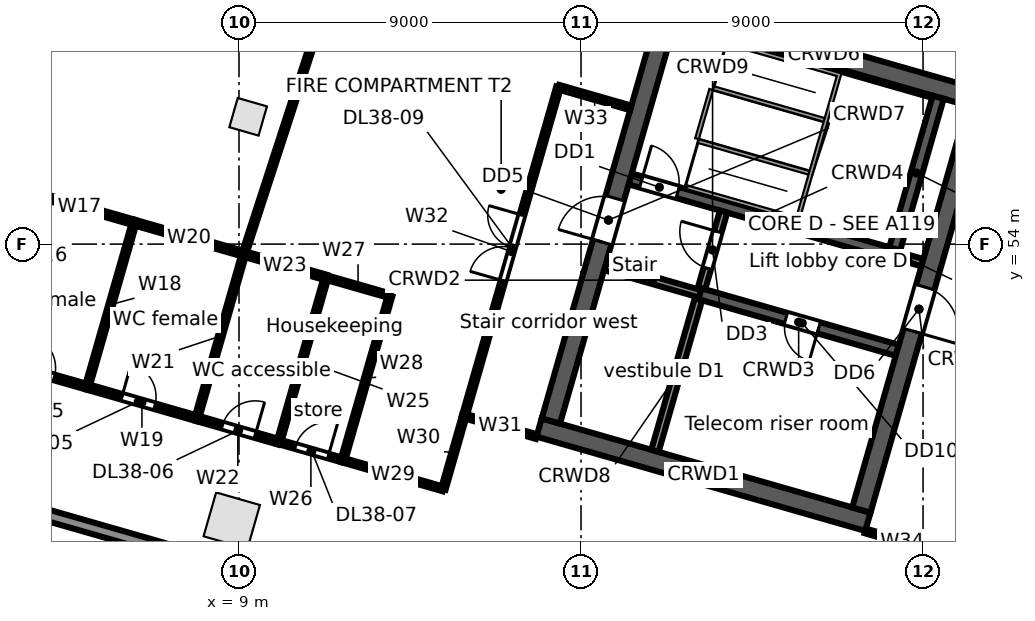
"""IFC4 building model, lengths in metres.
Left out: names, types, materials, properties, quantities, classifications, styles, units other than length and angle.
Written with IfcOpenShell. Run it as: python <this file> out.ifc"""

import sys

from ifc_helpers import new_model, si_unit, direction, frame, frame_2d, origin, origin_2d, place, context, subcontext, project, spatial, rectangle, extrude, element, fill, save


model = new_model("IFC4")
c1 = context("Model", 3, precision=1e-05, world=origin(), true_north=direction((0.0, 1.0)))
c2 = subcontext(c1, "Body", "Model", "MODEL_VIEW")
j1 = project(units=[si_unit("LENGTHUNIT", "METRE"), si_unit("PLANEANGLEUNIT", "RADIAN")], contexts=[c1])
p1 = place(None, origin())
s1 = spatial("IfcSite", under=j1, at=p1, CompositionType="ELEMENT")
p2 = place(p1, origin())
s2 = spatial("IfcBuilding", under=s1, at=p2, CompositionType="ELEMENT")
p3 = place(p2, frame((0.0, 0.0, 186.9)))
s3 = spatial("IfcBuildingStorey", under=s2, at=p3, CompositionType="ELEMENT", Elevation=186.9)
p4 = place(p3, frame((8.81, 46.722, 0.0), z_axis=(0.0, 0.0, 1.0), x_axis=(0.961261695938, -0.275637355817, 0.0)))
e1 = element("IfcColumn", 1, at=p4, inside=s3, PredefinedType="COLUMN", context=c2, shape_type="SweptSolid", body=[
    extrude(rectangle(XDim=1.2, YDim=1.2, at=origin_2d()), origin(), (0.0, 0.0, 1.0), 4.0),
])
p5 = place(p3, frame((9.241, 57.35, 0.0), z_axis=(0.0, 0.0, 1.0), x_axis=(0.961261695938, -0.275637355817, 0.0)))
e2 = element("IfcColumn", 2, at=p5, inside=s3, PredefinedType="COLUMN", context=c2, shape_type="SweptSolid", body=[
    extrude(rectangle(XDim=0.8, YDim=0.8, at=origin_2d()), origin(), (0.0, 0.0, 1.0), 4.0),
])
p6 = place(p3, frame((24.042, 41.106, 0.0), z_axis=(0.0, 0.0, 1.0), x_axis=(-0.961261693976, 0.275637362661, 0.0)))
e3 = element("IfcWall", 3, at=p6, inside=s3, PredefinedType="STANDARD", context=c2, shape_type="SweptSolid", body=[
    extrude(rectangle(XDim=24.948, YDim=0.3, at=frame_2d((12.474, 0.0))), origin(), (0.0, 0.0, 1.0), 3.68),
])
p7 = place(p6, frame((21.441, 0.0, 0.6)))
e4 = element("IfcOpeningElement", 4, at=p7, cuts=e3, PredefinedType="OPENING", context=c2, shape_type="SweptSolid", body=[
    extrude(rectangle(XDim=0.9, YDim=2.4, at=frame_2d((0.45, 1.2))), frame((0.0, 0.16, 0.0), z_axis=(0.0, -1.0, 0.0), x_axis=(1.0, 0.0, 0.0)), (0.0, 0.0, 1.0), 0.32),
])
p8 = place(p6, frame((13.121, 0.0, 0.6)))
e5 = element("IfcOpeningElement", 5, at=p8, cuts=e3, PredefinedType="OPENING", context=c2, shape_type="SweptSolid", body=[
    extrude(rectangle(XDim=0.9, YDim=2.4, at=frame_2d((0.45, 1.2))), frame((0.0, 0.16, 0.0), z_axis=(0.0, -1.0, 0.0), x_axis=(1.0, 0.0, 0.0)), (0.0, 0.0, 1.0), 0.32),
])
p9 = place(p6, frame((10.591, 0.0, 0.0)))
e6 = element("IfcOpeningElement", 6, at=p9, cuts=e3, PredefinedType="OPENING", context=c2, shape_type="SweptSolid", body=[
    extrude(rectangle(XDim=1.8, YDim=2.4, at=frame_2d((0.9, 1.2))), frame((0.0, 0.16, 0.0), z_axis=(0.0, -1.0, 0.0), x_axis=(1.0, 0.0, 0.0)), (0.0, 0.0, 1.0), 0.32),
])
p10 = place(p6, frame((4.8, 0.0, 0.6)))
e7 = element("IfcOpeningElement", 7, at=p10, cuts=e3, PredefinedType="OPENING", context=c2, shape_type="SweptSolid", body=[
    extrude(rectangle(XDim=0.9, YDim=2.4, at=frame_2d((0.45, 1.2))), frame((0.0, 0.16, 0.0), z_axis=(0.0, -1.0, 0.0), x_axis=(1.0, 0.0, 0.0)), (0.0, 0.0, 1.0), 0.32),
])
p11 = place(p6, frame((2.27, 0.0, 0.0)))
e8 = element("IfcOpeningElement", 8, at=p11, cuts=e3, PredefinedType="OPENING", context=c2, shape_type="SweptSolid", body=[
    extrude(rectangle(XDim=1.8, YDim=2.4, at=frame_2d((0.9, 1.2))), frame((0.0, 0.16, 0.0), z_axis=(0.0, -1.0, 0.0), x_axis=(1.0, 0.0, 0.0)), (0.0, 0.0, 1.0), 0.32),
])
p12 = place(p3, frame((37.399, 59.851, 0.0), z_axis=(0.0, 0.0, 1.0), x_axis=(-0.529919986982, -0.848047644532, 0.0)))
e9 = element("IfcWall", 9, at=p12, inside=s3, PredefinedType="STANDARD", context=c2, shape_type="SweptSolid", body=[
    extrude(rectangle(XDim=21.125, YDim=0.3, at=frame_2d((10.562, 0.0))), origin(), (0.0, 0.0, 1.0), 3.68),
])
p13 = place(p12, frame((16.687, 0.0, 0.6)))
e10 = element("IfcOpeningElement", 10, at=p13, cuts=e9, PredefinedType="OPENING", context=c2, shape_type="SweptSolid", body=[
    extrude(rectangle(XDim=0.9, YDim=2.4, at=frame_2d((0.45, 1.2))), frame((0.0, 0.16, 0.0), z_axis=(0.0, -1.0, 0.0), x_axis=(1.0, 0.0, 0.0)), (0.0, 0.0, 1.0), 0.32),
])
p14 = place(p12, frame((6.187, 0.0, 0.6)))
e11 = element("IfcOpeningElement", 11, at=p14, cuts=e9, PredefinedType="OPENING", context=c2, shape_type="SweptSolid", body=[
    extrude(rectangle(XDim=0.9, YDim=2.4, at=frame_2d((0.45, 1.2))), frame((0.0, 0.16, 0.0), z_axis=(0.0, -1.0, 0.0), x_axis=(1.0, 0.0, 0.0)), (0.0, 0.0, 1.0), 0.32),
])
p15 = place(p3, frame((16.897, 49.173, 0.0), z_axis=(0.0, 0.0, 1.0), x_axis=(0.96126248289, -0.275634611374, 0.0)))
e12 = element("IfcWall", 12, at=p15, inside=s3, PredefinedType="SOLIDWALL", context=c2, shape_type="SweptSolid", body=[
    extrude(rectangle(XDim=9.0, YDim=0.5, at=frame_2d((4.5, 0.0))), origin(), (0.0, 0.0, 1.0), 3.68),
])
p16 = place(p3, frame((18.632, 53.409, 0.0), z_axis=(0.0, 0.0, 1.0), x_axis=(0.961247078216, -0.275688328772, 0.0)))
e13 = element("IfcWall", 13, at=p16, inside=s3, PredefinedType="SOLIDWALL", context=c2, shape_type="SweptSolid", body=[
    extrude(rectangle(XDim=2.6, YDim=0.2, at=frame_2d((1.3, 0.0))), origin(), (0.0, 0.0, 1.0), 3.68),
])
p17 = place(p3, frame((21.131, 52.692, 0.0), z_axis=(0.0, 0.0, 1.0), x_axis=(0.961271043721, -0.27560475414, 0.0)))
e14 = element("IfcWall", 14, at=p17, inside=s3, PredefinedType="SOLIDWALL", context=c2, shape_type="SweptSolid", body=[
    extrude(rectangle(XDim=5.4, YDim=0.3, at=frame_2d((2.7, 0.0))), origin(), (0.0, 0.0, 1.0), 3.68),
])
p18 = place(p17, frame((2.35, 0.0, 0.0)))
e15 = element("IfcOpeningElement", 15, at=p18, cuts=e14, PredefinedType="OPENING", context=c2, shape_type="SweptSolid", body=[
    extrude(rectangle(XDim=0.9, YDim=2.1, at=frame_2d((0.45, 1.05))), frame((0.0, 0.16, 0.0), z_axis=(0.0, -1.0, 0.0), x_axis=(1.0, 0.0, 0.0)), (0.0, 0.0, 1.0), 0.32),
])
p19 = place(p3, frame((19.293, 55.716, 0.0), z_axis=(0.0, 0.0, 1.0), x_axis=(0.96125862491, -0.275648065539, 0.0)))
e16 = element("IfcWall", 16, at=p19, inside=s3, PredefinedType="SOLIDWALL", context=c2, shape_type="SweptSolid", body=[
    extrude(rectangle(XDim=7.2, YDim=0.3, at=frame_2d((3.6, 0.0))), origin(), (0.0, 0.0, 1.0), 3.68),
])
p20 = place(p19, frame((0.3, 0.0, 0.0)))
e17 = element("IfcOpeningElement", 17, at=p20, cuts=e16, PredefinedType="OPENING", context=c2, shape_type="SweptSolid", body=[
    extrude(rectangle(XDim=1.0, YDim=2.1, at=frame_2d((0.5, 1.05))), frame((0.0, 0.16, 0.0), z_axis=(0.0, -1.0, 0.0), x_axis=(1.0, 0.0, 0.0)), (0.0, 0.0, 1.0), 0.32),
])
p21 = place(p3, frame((26.214, 53.732, 0.0), z_axis=(0.0, 0.0, 1.0), x_axis=(0.961200870072, -0.275849392554, 0.0)))
e18 = element("IfcWall", 18, at=p21, inside=s3, PredefinedType="SOLIDWALL", context=c2, shape_type="SweptSolid", body=[
    extrude(rectangle(XDim=0.8, YDim=0.2, at=frame_2d((0.4, 0.0))), origin(), (0.0, 0.0, 1.0), 3.68),
])
p22 = place(p3, frame((20.067, 60.228, 0.0), z_axis=(0.0, 0.0, 1.0), x_axis=(0.96126248289, -0.275634611374, 0.0)))
e19 = element("IfcWall", 19, at=p22, inside=s3, PredefinedType="SOLIDWALL", context=c2, shape_type="SweptSolid", body=[
    extrude(rectangle(XDim=9.0, YDim=0.5, at=frame_2d((4.5, 0.0))), origin(), (0.0, 0.0, 1.0), 3.68),
])
p23 = place(p3, frame((17.206, 49.344, 0.0), z_axis=(0.0, 0.0, 1.0), x_axis=(0.275632651182, 0.961263044958, 0.0)))
e20 = element("IfcWall", 20, at=p23, inside=s3, PredefinedType="SOLIDWALL", context=c2, shape_type="SweptSolid", body=[
    extrude(rectangle(XDim=11.0, YDim=0.5, at=frame_2d((5.5, 0.0))), origin(), (0.0, 0.0, 1.0), 3.68),
])
p24 = place(p23, frame((4.9, 0.0, 0.0)))
e21 = element("IfcOpeningElement", 21, at=p24, cuts=e20, PredefinedType="OPENING", context=c2, shape_type="SweptSolid", body=[
    extrude(rectangle(XDim=1.2, YDim=2.1, at=frame_2d((0.6, 1.05))), frame((0.0, 0.26, 0.0), z_axis=(0.0, -1.0, 0.0), x_axis=(1.0, 0.0, 0.0)), (0.0, 0.0, 1.0), 0.52),
])
p25 = place(p3, frame((19.946, 48.559, 0.0), z_axis=(0.0, 0.0, 1.0), x_axis=(0.275668905258, 0.961252648721, 0.0)))
e22 = element("IfcWall", 22, at=p25, inside=s3, PredefinedType="SOLIDWALL", context=c2, shape_type="SweptSolid", body=[
    extrude(rectangle(XDim=4.15, YDim=0.2, at=frame_2d((2.075, 0.0))), origin(), (0.0, 0.0, 1.0), 3.68),
])
p26 = place(p3, frame((21.172, 52.837, 0.0), z_axis=(0.0, 0.0, 1.0), x_axis=(0.275657676022, 0.961255868981, 0.0)))
e23 = element("IfcWall", 23, at=p26, inside=s3, PredefinedType="PARTITIONING", context=c2, shape_type="SweptSolid", body=[
    extrude(rectangle(XDim=2.1, YDim=0.2, at=frame_2d((1.05, 0.0))), origin(), (0.0, 0.0, 1.0), 3.68),
])
p27 = place(p26, frame((0.55, 0.0, 0.0)))
e24 = element("IfcOpeningElement", 24, at=p27, cuts=e23, PredefinedType="OPENING", context=c2, shape_type="SweptSolid", body=[
    extrude(rectangle(XDim=1.0, YDim=2.1, at=frame_2d((0.5, 1.05))), frame((0.0, 0.11, 0.0), z_axis=(0.0, -1.0, 0.0), x_axis=(1.0, 0.0, 0.0)), (0.0, 0.0, 1.0), 0.22),
])
p28 = place(p3, frame((26.256, 53.876, 0.0), z_axis=(0.0, 0.0, 1.0), x_axis=(0.275614546295, 0.961268236171, 0.0)))
e25 = element("IfcWall", 25, at=p28, inside=s3, PredefinedType="SOLIDWALL", context=c2, shape_type="SweptSolid", body=[
    extrude(rectangle(XDim=4.15, YDim=0.3, at=frame_2d((2.075, 0.0))), origin(), (0.0, 0.0, 1.0), 3.68),
])
p29 = place(p3, frame((25.377, 47.002, 0.0), z_axis=(0.0, 0.0, 1.0), x_axis=(0.275632651182, 0.961263044958, 0.0)))
e26 = element("IfcWall", 26, at=p29, inside=s3, PredefinedType="SOLIDWALL", context=c2, shape_type="SweptSolid", body=[
    extrude(rectangle(XDim=11.0, YDim=0.5, at=frame_2d((5.5, 0.0))), origin(), (0.0, 0.0, 1.0), 3.68),
])
p30 = place(p29, frame((4.9, 0.0, 0.0)))
e27 = element("IfcOpeningElement", 27, at=p30, cuts=e26, PredefinedType="OPENING", context=c2, shape_type="SweptSolid", body=[
    extrude(rectangle(XDim=1.2, YDim=2.1, at=frame_2d((0.6, 1.05))), frame((0.0, 0.26, 0.0), z_axis=(0.0, -1.0, 0.0), x_axis=(1.0, 0.0, 0.0)), (0.0, 0.0, 1.0), 0.52),
])
p31 = place(p3, frame((2.601, 50.932, 0.0), z_axis=(0.0, 0.0, 1.0), x_axis=(0.961265528111, -0.275623991092, 0.0)))
e28 = element("IfcWall", 28, at=p31, inside=s3, PredefinedType="PARTITIONING", context=c2, shape_type="SweptSolid", body=[
    extrude(rectangle(XDim=2.5, YDim=0.15, at=frame_2d((1.25, 0.0))), origin(), (0.0, 0.0, 1.0), 3.68),
])
p32 = place(p31, frame((0.7, 0.0, 0.0)))
e29 = element("IfcOpeningElement", 29, at=p32, cuts=e28, PredefinedType="OPENING", context=c2, shape_type="SweptSolid", body=[
    extrude(rectangle(XDim=0.9, YDim=2.1, at=frame_2d((0.45, 1.05))), frame((0.0, 0.085, 0.0), z_axis=(0.0, -1.0, 0.0), x_axis=(1.0, 0.0, 0.0)), (0.0, 0.0, 1.0), 0.17),
])
p33 = place(p3, frame((3.361, 55.395, 0.0), z_axis=(0.0, 0.0, 1.0), x_axis=(0.961268664977, -0.27561305073, 0.0)))
e30 = element("IfcWall", 30, at=p33, inside=s3, PredefinedType="PARTITIONING", context=c2, shape_type="SweptSolid", body=[
    extrude(rectangle(XDim=3.0, YDim=0.15, at=frame_2d((1.5, 0.0))), origin(), (0.0, 0.0, 1.0), 3.68),
])
p34 = place(p3, frame((5.004, 50.243, 0.0), z_axis=(0.0, 0.0, 1.0), x_axis=(0.275838825927, 0.961203902464, 0.0)))
e31 = element("IfcWall", 31, at=p34, inside=s3, PredefinedType="PARTITIONING", context=c2, shape_type="SweptSolid", body=[
    extrude(rectangle(XDim=4.5, YDim=0.125, at=frame_2d((2.25, 0.0))), origin(), (0.0, 0.0, 1.0), 3.68),
])
p35 = place(p3, frame((5.004, 50.243, 0.0), z_axis=(0.0, 0.0, 1.0), x_axis=(0.961268664977, -0.27561305073, 0.0)))
e32 = element("IfcWall", 32, at=p35, inside=s3, PredefinedType="PARTITIONING", context=c2, shape_type="SweptSolid", body=[
    extrude(rectangle(XDim=3.0, YDim=0.15, at=frame_2d((1.5, 0.0))), origin(), (0.0, 0.0, 1.0), 3.68),
])
p36 = place(p35, frame((0.95, 0.0, 0.0)))
e33 = element("IfcOpeningElement", 33, at=p36, cuts=e32, PredefinedType="OPENING", context=c2, shape_type="SweptSolid", body=[
    extrude(rectangle(XDim=0.9, YDim=2.1, at=frame_2d((0.45, 1.05))), frame((0.0, 0.085, 0.0), z_axis=(0.0, -1.0, 0.0), x_axis=(1.0, 0.0, 0.0)), (0.0, 0.0, 1.0), 0.17),
])
p37 = place(p3, frame((6.245, 54.568, 0.0), z_axis=(0.0, 0.0, 1.0), x_axis=(0.961240918172, -0.275709806194, 0.0)))
e34 = element("IfcWall", 34, at=p37, inside=s3, PredefinedType="PARTITIONING", context=c2, shape_type="SweptSolid", body=[
    extrude(rectangle(XDim=3.0, YDim=0.15, at=frame_2d((1.5, 0.0))), origin(), (0.0, 0.0, 1.0), 2.852),
])
p38 = place(p3, frame((7.888, 49.416, 0.0), z_axis=(0.0, 0.0, 1.0), x_axis=(0.275803080638, 0.96121415965, 0.0)))
e35 = element("IfcWall", 35, at=p38, inside=s3, PredefinedType="PARTITIONING", context=c2, shape_type="SweptSolid", body=[
    extrude(rectangle(XDim=4.5, YDim=0.125, at=frame_2d((2.25, 0.0))), origin(), (0.0, 0.0, 1.0), 2.852),
])
p39 = place(p3, frame((7.888, 49.416, 0.0), z_axis=(0.0, 0.0, 1.0), x_axis=(0.9611628742, -0.275981755301, 0.0)))
e36 = element("IfcWall", 36, at=p39, inside=s3, PredefinedType="PARTITIONING", context=c2, shape_type="SweptSolid", body=[
    extrude(rectangle(XDim=2.25, YDim=0.15, at=frame_2d((1.125, 0.0))), origin(), (0.0, 0.0, 1.0), 2.748),
])
p40 = place(p39, frame((0.7, 0.0, 0.0)))
e37 = element("IfcOpeningElement", 37, at=p40, cuts=e36, PredefinedType="OPENING", context=c2, shape_type="SweptSolid", body=[
    extrude(rectangle(XDim=0.9, YDim=2.1, at=frame_2d((0.45, 1.05))), frame((0.0, 0.085, 0.0), z_axis=(0.0, -1.0, 0.0), x_axis=(1.0, 0.0, 0.0)), (0.0, 0.0, 1.0), 0.17),
])
p41 = place(p3, frame((9.129, 53.741, 0.0), z_axis=(0.0, 0.0, 1.0), x_axis=(0.961273691875, -0.275595517578, 0.0)))
e38 = element("IfcWall", 38, at=p41, inside=s3, PredefinedType="PARTITIONING", context=c2, shape_type="SweptSolid", body=[
    extrude(rectangle(XDim=2.249, YDim=0.15, at=frame_2d((1.125, 0.0))), origin(), (0.0, 0.0, 1.0), 2.748),
])
p42 = place(p3, frame((9.129, 53.741, 0.0), z_axis=(0.0, 0.0, 1.0), x_axis=(0.309576741849, 0.950874461171, 0.0)))
e39 = element("IfcWall", 39, at=p42, inside=s3, PredefinedType="PARTITIONING", context=c2, shape_type="SweptSolid", body=[
    extrude(rectangle(XDim=14.895, YDim=0.125, at=frame_2d((7.447, 0.0))), origin(), (0.0, 0.0, 1.0), 2.748),
])
p43 = place(p3, frame((10.051, 48.795, 0.0), z_axis=(0.0, 0.0, 1.0), x_axis=(0.275530671241, 0.961292280841, 0.0)))
e40 = element("IfcWall", 40, at=p43, inside=s3, PredefinedType="PARTITIONING", context=c2, shape_type="SweptSolid", body=[
    extrude(rectangle(XDim=4.5, YDim=0.125, at=frame_2d((2.25, 0.0))), origin(), (0.0, 0.0, 1.0), 3.68),
])
p44 = place(p3, frame((10.051, 48.795, 0.0), z_axis=(0.0, 0.0, 1.0), x_axis=(0.961313033798, -0.275458256455, 0.0)))
e41 = element("IfcWall", 41, at=p44, inside=s3, PredefinedType="PARTITIONING", context=c2, shape_type="SweptSolid", body=[
    extrude(rectangle(XDim=1.75, YDim=0.125, at=frame_2d((0.875, 0.0))), origin(), (0.0, 0.0, 1.0), 3.68),
])
p45 = place(p44, frame((0.45, 0.0, 0.0)))
e42 = element("IfcOpeningElement", 42, at=p45, cuts=e41, PredefinedType="OPENING", context=c2, shape_type="SweptSolid", body=[
    extrude(rectangle(XDim=0.9, YDim=2.1, at=frame_2d((0.45, 1.05))), frame((0.0, 0.073, 0.0), z_axis=(0.0, -1.0, 0.0), x_axis=(1.0, 0.0, 0.0)), (0.0, 0.0, 1.0), 0.145),
])
p46 = place(p3, frame((11.291, 53.121, 0.0), z_axis=(0.0, 0.0, 1.0), x_axis=(0.961329010357, -0.275402494264, 0.0)))
e43 = element("IfcWall", 43, at=p46, inside=s3, PredefinedType="PARTITIONING", context=c2, shape_type="SweptSolid", body=[
    extrude(rectangle(XDim=1.751, YDim=0.125, at=frame_2d((0.875, 0.0))), origin(), (0.0, 0.0, 1.0), 3.68),
])
p47 = place(p3, frame((11.733, 48.313, 0.0), z_axis=(0.0, 0.0, 1.0), x_axis=(0.275795676316, 0.961216284155, 0.0)))
e44 = element("IfcWall", 44, at=p47, inside=s3, PredefinedType="PARTITIONING", context=c2, shape_type="SweptSolid", body=[
    extrude(rectangle(XDim=4.5, YDim=0.125, at=frame_2d((2.25, 0.0))), origin(), (0.0, 0.0, 1.0), 3.68),
])
p48 = place(p3, frame((11.733, 48.313, 0.0), z_axis=(0.0, 0.0, 1.0), x_axis=(0.961272337704, -0.275600240865, 0.0)))
e45 = element("IfcWall", 45, at=p48, inside=s3, PredefinedType="PARTITIONING", context=c2, shape_type="SweptSolid", body=[
    extrude(rectangle(XDim=2.75, YDim=0.125, at=frame_2d((1.375, 0.0))), origin(), (0.0, 0.0, 1.0), 3.68),
])
p49 = place(p3, frame((14.377, 47.555, 0.0), z_axis=(0.0, 0.0, 1.0), x_axis=(0.275446387355, 0.961316434736, 0.0)))
e46 = element("IfcWall", 46, at=p49, inside=s3, PredefinedType="PARTITIONING", context=c2, shape_type="SweptSolid", body=[
    extrude(rectangle(XDim=2.0, YDim=0.125, at=frame_2d((1.0, 0.0))), origin(), (0.0, 0.0, 1.0), 3.68),
])
p50 = place(p3, frame((14.928, 49.478, 0.0), z_axis=(0.0, 0.0, 1.0), x_axis=(0.961243778232, -0.27569983462, 0.0)))
e47 = element("IfcWall", 47, at=p50, inside=s3, PredefinedType="PARTITIONING", context=c2, shape_type="SweptSolid", body=[
    extrude(rectangle(XDim=1.977, YDim=0.125, at=frame_2d((0.988, 0.0))), origin(), (0.0, 0.0, 1.0), 3.68),
])
p51 = place(p3, frame((14.928, 49.478, 0.0), z_axis=(0.0, 0.0, 1.0), x_axis=(0.275674053528, 0.961251172281, 0.0)))
e48 = element("IfcWall", 48, at=p51, inside=s3, PredefinedType="PARTITIONING", context=c2, shape_type="SweptSolid", body=[
    extrude(rectangle(XDim=9.0, YDim=0.125, at=frame_2d((4.5, 0.0))), origin(), (0.0, 0.0, 1.0), 2.748),
])
p52 = place(p51, frame((3.7, 0.0, 0.0)))
e49 = element("IfcOpeningElement", 49, at=p52, cuts=e48, PredefinedType="OPENING", context=c2, shape_type="SweptSolid", body=[
    extrude(rectangle(XDim=1.8, YDim=2.1, at=frame_2d((0.9, 1.05))), frame((0.0, 0.073, 0.0), z_axis=(0.0, -1.0, 0.0), x_axis=(1.0, 0.0, 0.0)), (0.0, 0.0, 1.0), 0.145),
])
p53 = place(p3, frame((17.409, 58.129, 0.0), z_axis=(0.0, 0.0, 1.0), x_axis=(0.961253165474, -0.275667103345, 0.0)))
e50 = element("IfcWall", 50, at=p53, inside=s3, PredefinedType="PARTITIONING", context=c2, shape_type="SweptSolid", body=[
    extrude(rectangle(XDim=1.977, YDim=0.125, at=frame_2d((0.988, 0.0))), origin(), (0.0, 0.0, 1.0), 3.68),
])
p54 = place(p3, frame((25.479, 46.452, 0.0), z_axis=(0.0, 0.0, 1.0), x_axis=(0.961245725795, -0.275693044238, 0.0)))
e51 = element("IfcWall", 51, at=p54, inside=s3, PredefinedType="PARTITIONING", context=c2, shape_type="SweptSolid", body=[
    extrude(rectangle(XDim=2.023, YDim=0.125, at=frame_2d((1.012, 0.0))), origin(), (0.0, 0.0, 1.0), 2.952),
])
p55 = place(p20, origin())
e52 = element("IfcDoor", 52, at=p55, inside=s3, OperationType="SINGLE_SWING_LEFT", PredefinedType="DOOR", context=c2, shape_type="SweptSolid", body=[
    extrude(rectangle(XDim=1.0, YDim=2.1, at=frame_2d((0.5, 1.05))), frame((0.0, 0.025, 0.0), z_axis=(0.0, -1.0, 0.0), x_axis=(1.0, 0.0, 0.0)), (0.0, 0.0, 1.0), 0.05),
])
fill(e17, e52)
p56 = place(p27, origin())
e53 = element("IfcDoor", 53, at=p56, inside=s3, OperationType="SINGLE_SWING_RIGHT", PredefinedType="DOOR", context=c2, shape_type="SweptSolid", body=[
    extrude(rectangle(XDim=1.0, YDim=2.1, at=frame_2d((0.5, 1.05))), frame((0.0, 0.025, 0.0), z_axis=(0.0, -1.0, 0.0), x_axis=(1.0, 0.0, 0.0)), (0.0, 0.0, 1.0), 0.05),
])
fill(e24, e53)
p57 = place(p24, origin())
e54 = element("IfcDoor", 54, at=p57, inside=s3, OperationType="SINGLE_SWING_LEFT", PredefinedType="DOOR", context=c2, shape_type="SweptSolid", body=[
    extrude(rectangle(XDim=1.2, YDim=2.1, at=frame_2d((0.6, 1.05))), frame((0.0, 0.025, 0.0), z_axis=(0.0, -1.0, 0.0), x_axis=(1.0, 0.0, 0.0)), (0.0, 0.0, 1.0), 0.05),
])
fill(e21, e54)
p58 = place(p30, frame((1.2, 0.0, 0.0), z_axis=(0.0, 0.0, 1.0), x_axis=(-1.0, 0.0, 0.0)))
e55 = element("IfcDoor", 55, at=p58, inside=s3, OperationType="SINGLE_SWING_RIGHT", PredefinedType="DOOR", context=c2, shape_type="SweptSolid", body=[
    extrude(rectangle(XDim=1.2, YDim=2.1, at=frame_2d((0.6, 1.05))), frame((0.0, 0.025, 0.0), z_axis=(0.0, -1.0, 0.0), x_axis=(1.0, 0.0, 0.0)), (0.0, 0.0, 1.0), 0.05),
])
fill(e27, e55)
p59 = place(p18, frame((0.9, 0.0, 0.0), z_axis=(0.0, 0.0, 1.0), x_axis=(-1.0, 0.0, 0.0)))
e56 = element("IfcDoor", 56, at=p59, inside=s3, OperationType="SINGLE_SWING_LEFT", PredefinedType="DOOR", context=c2, shape_type="SweptSolid", body=[
    extrude(rectangle(XDim=0.9, YDim=2.1, at=frame_2d((0.45, 1.05))), frame((0.0, 0.025, 0.0), z_axis=(0.0, -1.0, 0.0), x_axis=(1.0, 0.0, 0.0)), (0.0, 0.0, 1.0), 0.05),
])
fill(e15, e56)
p60 = place(p32, origin())
e57 = element("IfcDoor", 57, at=p60, inside=s3, OperationType="SINGLE_SWING_LEFT", PredefinedType="DOOR", context=c2, shape_type="SweptSolid", body=[
    extrude(rectangle(XDim=0.9, YDim=2.1, at=frame_2d((0.45, 1.05))), frame((0.0, 0.025, 0.0), z_axis=(0.0, -1.0, 0.0), x_axis=(1.0, 0.0, 0.0)), (0.0, 0.0, 1.0), 0.05),
])
fill(e29, e57)
p61 = place(p36, origin())
e58 = element("IfcDoor", 58, at=p61, inside=s3, OperationType="SINGLE_SWING_LEFT", PredefinedType="DOOR", context=c2, shape_type="SweptSolid", body=[
    extrude(rectangle(XDim=0.9, YDim=2.1, at=frame_2d((0.45, 1.05))), frame((0.0, 0.025, 0.0), z_axis=(0.0, -1.0, 0.0), x_axis=(1.0, 0.0, 0.0)), (0.0, 0.0, 1.0), 0.05),
])
fill(e33, e58)
p62 = place(p40, origin())
e59 = element("IfcDoor", 59, at=p62, inside=s3, OperationType="SINGLE_SWING_RIGHT", PredefinedType="DOOR", context=c2, shape_type="SweptSolid", body=[
    extrude(rectangle(XDim=0.9, YDim=2.1, at=frame_2d((0.45, 1.05))), frame((0.0, 0.025, 0.0), z_axis=(0.0, -1.0, 0.0), x_axis=(1.0, 0.0, 0.0)), (0.0, 0.0, 1.0), 0.05),
])
fill(e37, e59)
p63 = place(p45, origin())
e60 = element("IfcDoor", 60, at=p63, inside=s3, OperationType="SINGLE_SWING_RIGHT", PredefinedType="DOOR", context=c2, shape_type="SweptSolid", body=[
    extrude(rectangle(XDim=0.9, YDim=2.1, at=frame_2d((0.45, 1.05))), frame((0.0, 0.025, 0.0), z_axis=(0.0, -1.0, 0.0), x_axis=(1.0, 0.0, 0.0)), (0.0, 0.0, 1.0), 0.05),
])
fill(e42, e60)
p64 = place(p52, origin())
e61 = element("IfcDoor", 61, at=p64, inside=s3, OperationType="DOUBLE_DOOR_SINGLE_SWING", PredefinedType="DOOR", context=c2, shape_type="SweptSolid", body=[
    extrude(rectangle(XDim=1.8, YDim=2.1, at=frame_2d((0.9, 1.05))), frame((0.0, 0.025, 0.0), z_axis=(0.0, -1.0, 0.0), x_axis=(1.0, 0.0, 0.0)), (0.0, 0.0, 1.0), 0.05),
])
fill(e49, e61)
save(model, sys.argv[1])
